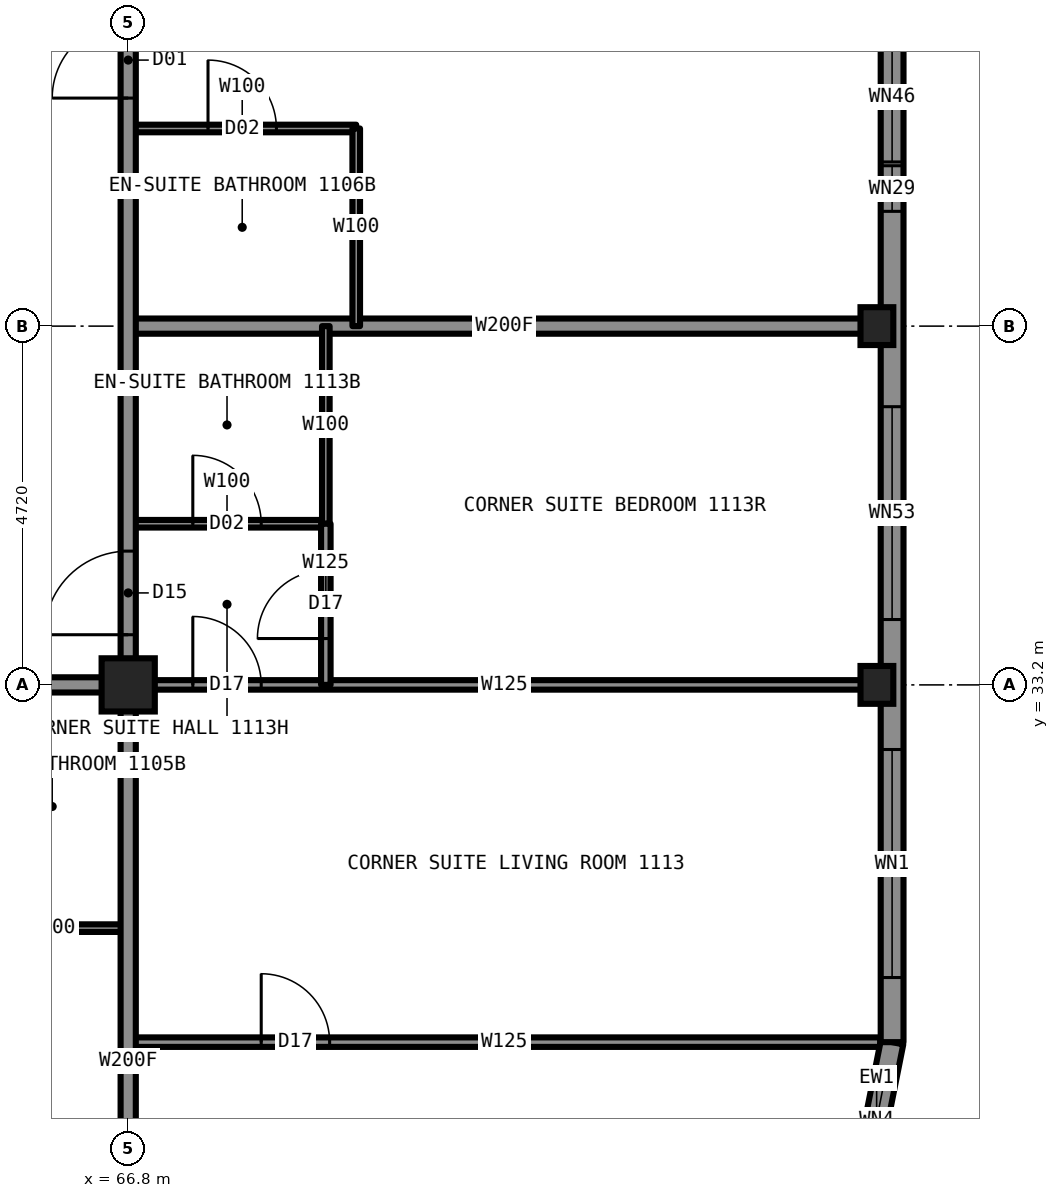
"""IFC4 building model, lengths in metres.
Left out: names, types, materials, properties, quantities, classifications, styles, units other than length and angle.
Written with IfcOpenShell. Run it as: python <this file> out.ifc"""

import sys

from ifc_helpers import new_model, si_unit, direction, frame, frame_2d, origin, origin_2d, place, context, subcontext, project, spatial, rectangle, hollow_rectangle, i_section, extrude, element, fill, save


model = new_model("IFC4")
c1 = context("Model", 3, precision=1e-05, world=origin(), true_north=direction((0.0, 1.0)))
c2 = subcontext(c1, "Body", "Model", "MODEL_VIEW")
j1 = project(units=[si_unit("LENGTHUNIT", "METRE"), si_unit("PLANEANGLEUNIT", "RADIAN")], contexts=[c1])
p1 = place(None, origin())
s1 = spatial("IfcSite", under=j1, at=p1, CompositionType="ELEMENT")
p2 = place(p1, origin())
s2 = spatial("IfcBuilding", under=s1, at=p2, CompositionType="ELEMENT")
p3 = place(p2, frame((0.0, 0.0, 39.0)))
s3 = spatial("IfcBuildingStorey", under=s2, at=p3, CompositionType="ELEMENT", Elevation=39.0)
for number, where, z_axis, x_axis in (
    (1, (76.65, 33.2, 0.0), (0.0, 0.0, 1.0), (1.0, 0.0, 0.0)),
    (2, (76.65, 37.92, 0.0), (0.0, 0.0, 1.0), (1.0, 0.0, 0.0)),
):
    element("IfcColumn", number, at=place(p3, frame(where, z_axis=z_axis, x_axis=x_axis)), inside=s3, PredefinedType="COLUMN", context=c2, shape_type="SweptSolid", body=[
        extrude(i_section(OverallWidth=0.432, OverallDepth=0.498, WebThickness=0.056, FlangeThickness=0.089, at=origin_2d()), origin(), (0.0, 0.0, 1.0), 3.5),
    ])
p4 = place(p3, frame((66.8, 33.2, 0.0), z_axis=(0.0, 0.0, 1.0), x_axis=(1.0, 0.0, 0.0)))
e3 = element("IfcColumn", 3, at=p4, inside=s3, PredefinedType="COLUMN", context=c2, shape_type="SweptSolid", body=[
    extrude(hollow_rectangle(XDim=0.7, YDim=0.7, WallThickness=0.06, at=origin_2d()), origin(), (0.0, 0.0, 1.0), 3.5),
])
p5 = place(p3, frame((43.2, 33.2, 0.0), z_axis=(0.0, 0.0, 1.0), x_axis=(1.0, 0.0, 0.0)))
e4 = element("IfcWall", 4, at=p5, inside=s3, PredefinedType="PARTITIONING", context=c2, shape_type="SweptSolid", body=[
    extrude(rectangle(XDim=23.6, YDim=0.2, at=frame_2d((11.8, 0.0))), origin(), (0.0, 0.0, 1.0), 3.33),
])
p6 = place(p5, frame((2.55, 0.0, 0.0)))
e5 = element("IfcOpeningElement", 5, at=p6, cuts=e4, PredefinedType="OPENING", context=c2, shape_type="SweptSolid", body=[
    extrude(rectangle(XDim=1.0, YDim=2.2, at=frame_2d((0.5, 1.1))), frame((0.0, 0.11, 0.0), z_axis=(0.0, -1.0, 0.0), x_axis=(1.0, 0.0, 0.0)), (0.0, 0.0, 1.0), 0.22),
])
p7 = place(p5, frame((6.57, 0.0, 0.0)))
e6 = element("IfcOpeningElement", 6, at=p7, cuts=e4, PredefinedType="OPENING", context=c2, shape_type="SweptSolid", body=[
    extrude(rectangle(XDim=1.1, YDim=2.2, at=frame_2d((0.55, 1.1))), frame((0.0, 0.11, 0.0), z_axis=(0.0, -1.0, 0.0), x_axis=(1.0, 0.0, 0.0)), (0.0, 0.0, 1.0), 0.22),
])
p8 = place(p5, frame((20.34, 0.0, 0.0)))
e7 = element("IfcOpeningElement", 7, at=p8, cuts=e4, PredefinedType="OPENING", context=c2, shape_type="SweptSolid", body=[
    extrude(rectangle(XDim=1.0, YDim=2.2, at=frame_2d((0.5, 1.1))), frame((0.0, 0.11, 0.0), z_axis=(0.0, -1.0, 0.0), x_axis=(1.0, 0.0, 0.0)), (0.0, 0.0, 1.0), 0.22),
])
p9 = place(p3, frame((66.8, 33.2, 0.0), z_axis=(0.0, 0.0, 1.0), x_axis=(1.0, 0.0, 0.0)))
e8 = element("IfcWall", 8, at=p9, inside=s3, PredefinedType="PARTITIONING", context=c2, shape_type="SweptSolid", body=[
    extrude(rectangle(XDim=9.9, YDim=0.125, at=frame_2d((4.95, 0.0))), origin(), (0.0, 0.0, 1.0), 2.573),
])
p10 = place(p9, frame((0.85, 0.0, 0.0)))
e9 = element("IfcOpeningElement", 9, at=p10, cuts=e8, PredefinedType="OPENING", context=c2, shape_type="SweptSolid", body=[
    extrude(rectangle(XDim=0.9, YDim=2.2, at=frame_2d((0.45, 1.1))), frame((0.0, 0.073, 0.0), z_axis=(0.0, -1.0, 0.0), x_axis=(1.0, 0.0, 0.0)), (0.0, 0.0, 1.0), 0.145),
])
p11 = place(p3, frame((64.8, 30.0, 0.0), z_axis=(0.0, 0.0, 1.0), x_axis=(1.0, 0.0, 0.0)))
e10 = element("IfcWall", 10, at=p11, inside=s3, PredefinedType="PARTITIONING", context=c2, shape_type="SweptSolid", body=[
    extrude(rectangle(XDim=2.0, YDim=0.1, at=frame_2d((1.0, 0.0))), origin(), (0.0, 0.0, 1.0), 3.33),
])
p12 = place(p3, frame((66.8, 28.5, 0.0), z_axis=(0.0, 0.0, 1.0), x_axis=(1.0, 0.0, 0.0)))
e11 = element("IfcWall", 11, at=p12, inside=s3, PredefinedType="PARTITIONING", context=c2, shape_type="SweptSolid", body=[
    extrude(rectangle(XDim=9.894, YDim=0.125, at=frame_2d((4.947, 0.0))), origin(), (0.0, 0.0, 1.0), 3.33),
])
p13 = place(p12, frame((1.75, 0.0, 0.0)))
e12 = element("IfcOpeningElement", 12, at=p13, cuts=e11, PredefinedType="OPENING", context=c2, shape_type="SweptSolid", body=[
    extrude(rectangle(XDim=0.9, YDim=2.2, at=frame_2d((0.45, 1.1))), frame((0.0, 0.073, 0.0), z_axis=(0.0, -1.0, 0.0), x_axis=(1.0, 0.0, 0.0)), (0.0, 0.0, 1.0), 0.145),
])
p14 = place(p3, frame((66.8, 40.52, 0.0), z_axis=(0.0, 0.0, 1.0), x_axis=(1.0, 0.0, 0.0)))
e13 = element("IfcWall", 13, at=p14, inside=s3, PredefinedType="PARTITIONING", context=c2, shape_type="SweptSolid", body=[
    extrude(rectangle(XDim=3.0, YDim=0.1, at=frame_2d((1.5, 0.0))), origin(), (0.0, 0.0, 1.0), 3.33),
])
p15 = place(p14, frame((1.05, 0.0, 0.0)))
e14 = element("IfcOpeningElement", 14, at=p15, cuts=e13, PredefinedType="OPENING", context=c2, shape_type="SweptSolid", body=[
    extrude(rectangle(XDim=0.9, YDim=2.1, at=frame_2d((0.45, 1.05))), frame((0.0, 0.06, 0.0), z_axis=(0.0, -1.0, 0.0), x_axis=(1.0, 0.0, 0.0)), (0.0, 0.0, 1.0), 0.12),
])
p16 = place(p3, frame((66.8, 37.92, 0.0), z_axis=(0.0, 0.0, 1.0), x_axis=(1.0, 0.0, 0.0)))
e15 = element("IfcWall", 15, at=p16, inside=s3, PredefinedType="PARTITIONING", context=c2, shape_type="SweptSolid", body=[
    extrude(rectangle(XDim=9.9, YDim=0.2, at=frame_2d((4.95, 0.0))), origin(), (0.0, 0.0, 1.0), 2.573),
])
p17 = place(p3, frame((66.8, 35.32, 0.0), z_axis=(0.0, 0.0, 1.0), x_axis=(1.0, 0.0, 0.0)))
e16 = element("IfcWall", 16, at=p17, inside=s3, PredefinedType="PARTITIONING", context=c2, shape_type="SweptSolid", body=[
    extrude(rectangle(XDim=2.6, YDim=0.1, at=frame_2d((1.3, 0.0))), origin(), (0.0, 0.0, 1.0), 3.33),
])
p18 = place(p17, frame((0.85, 0.0, 0.0)))
e17 = element("IfcOpeningElement", 17, at=p18, cuts=e16, PredefinedType="OPENING", context=c2, shape_type="SweptSolid", body=[
    extrude(rectangle(XDim=0.9, YDim=2.1, at=frame_2d((0.45, 1.05))), frame((0.0, 0.06, 0.0), z_axis=(0.0, -1.0, 0.0), x_axis=(1.0, 0.0, 0.0)), (0.0, 0.0, 1.0), 0.12),
])
p19 = place(p3, frame((66.8, 33.2, 0.0), z_axis=(0.0, 0.0, 1.0), x_axis=(0.0, 1.0, 0.0)))
e18 = element("IfcWall", 18, at=p19, inside=s3, PredefinedType="PARTITIONING", context=c2, shape_type="SweptSolid", body=[
    extrude(rectangle(XDim=23.58, YDim=0.2, at=frame_2d((11.79, 0.0))), origin(), (0.0, 0.0, 1.0), 3.33),
])
p20 = place(p19, frame((7.72, 0.0, 0.0)))
e19 = element("IfcOpeningElement", 19, at=p20, cuts=e18, PredefinedType="OPENING", context=c2, shape_type="SweptSolid", body=[
    extrude(rectangle(XDim=1.0, YDim=2.2, at=frame_2d((0.5, 1.1))), frame((0.0, 0.11, 0.0), z_axis=(0.0, -1.0, 0.0), x_axis=(1.0, 0.0, 0.0)), (0.0, 0.0, 1.0), 0.22),
])
p21 = place(p19, frame((17.31, 0.0, 0.0)))
e20 = element("IfcOpeningElement", 20, at=p21, cuts=e18, PredefinedType="OPENING", context=c2, shape_type="SweptSolid", body=[
    extrude(rectangle(XDim=1.0, YDim=2.2, at=frame_2d((0.5, 1.1))), frame((0.0, 0.11, 0.0), z_axis=(0.0, -1.0, 0.0), x_axis=(1.0, 0.0, 0.0)), (0.0, 0.0, 1.0), 0.22),
])
p22 = place(p19, frame((21.84, 0.0, 0.0)))
e21 = element("IfcOpeningElement", 21, at=p22, cuts=e18, PredefinedType="OPENING", context=c2, shape_type="SweptSolid", body=[
    extrude(rectangle(XDim=1.1, YDim=2.2, at=frame_2d((0.55, 1.1))), frame((0.0, 0.11, 0.0), z_axis=(0.0, -1.0, 0.0), x_axis=(1.0, 0.0, 0.0)), (0.0, 0.0, 1.0), 0.22),
])
p23 = place(p19, frame((0.66, 0.0, 0.0)))
e22 = element("IfcOpeningElement", 22, at=p23, cuts=e18, PredefinedType="OPENING", context=c2, shape_type="SweptSolid", body=[
    extrude(rectangle(XDim=1.1, YDim=2.2, at=frame_2d((0.55, 1.1))), frame((0.0, 0.11, 0.0), z_axis=(0.0, -1.0, 0.0), x_axis=(1.0, 0.0, 0.0)), (0.0, 0.0, 1.0), 0.22),
])
p24 = place(p3, frame((66.8, 23.3, 0.0), z_axis=(0.0, 0.0, 1.0), x_axis=(0.0, 1.0, 0.0)))
e23 = element("IfcWall", 23, at=p24, inside=s3, PredefinedType="PARTITIONING", context=c2, shape_type="SweptSolid", body=[
    extrude(rectangle(XDim=9.9, YDim=0.2, at=frame_2d((4.95, 0.0))), origin(), (0.0, 0.0, 1.0), 2.573),
])
p25 = place(p3, frame((69.4, 35.32, 0.0), z_axis=(0.0, 0.0, 1.0), x_axis=(0.0, 1.0, 0.0)))
e24 = element("IfcWall", 24, at=p25, inside=s3, PredefinedType="PARTITIONING", context=c2, shape_type="SweptSolid", body=[
    extrude(rectangle(XDim=2.6, YDim=0.1, at=frame_2d((1.3, 0.0))), origin(), (0.0, 0.0, 1.0), 3.33),
])
p26 = place(p3, frame((69.4, 33.2, 0.0), z_axis=(0.0, 0.0, 1.0), x_axis=(0.0, 1.0, 0.0)))
e25 = element("IfcWall", 25, at=p26, inside=s3, PredefinedType="PARTITIONING", context=c2, shape_type="SweptSolid", body=[
    extrude(rectangle(XDim=2.12, YDim=0.125, at=frame_2d((1.06, 0.0))), origin(), (0.0, 0.0, 1.0), 3.33),
])
p27 = place(p26, frame((0.61, 0.0, 0.0)))
e26 = element("IfcOpeningElement", 26, at=p27, cuts=e25, PredefinedType="OPENING", context=c2, shape_type="SweptSolid", body=[
    extrude(rectangle(XDim=0.9, YDim=2.2, at=frame_2d((0.45, 1.1))), frame((0.0, 0.073, 0.0), z_axis=(0.0, -1.0, 0.0), x_axis=(1.0, 0.0, 0.0)), (0.0, 0.0, 1.0), 0.145),
])
p28 = place(p3, frame((69.8, 37.92, 0.0), z_axis=(0.0, 0.0, 1.0), x_axis=(0.0, 1.0, 0.0)))
e27 = element("IfcWall", 27, at=p28, inside=s3, PredefinedType="PARTITIONING", context=c2, shape_type="SweptSolid", body=[
    extrude(rectangle(XDim=2.6, YDim=0.1, at=frame_2d((1.3, 0.0))), origin(), (0.0, 0.0, 1.0), 3.33),
])
p29 = place(p3, frame((76.443, 26.453, 0.0), z_axis=(0.0, 0.0, 1.0), x_axis=(0.195081421501, 0.980787050784, 0.0)))
e28 = element("IfcWall", 28, at=p29, inside=s3, PredefinedType="SOLIDWALL", context=c2, shape_type="SweptSolid", body=[
    extrude(rectangle(XDim=2.087, YDim=0.3, at=frame_2d((1.044, 0.0))), origin(), (0.0, 0.0, 1.0), 3.33),
])
p30 = place(p29, frame((0.444, 0.0, 0.5)))
e29 = element("IfcOpeningElement", 29, at=p30, cuts=e28, PredefinedType="OPENING", context=c2, shape_type="SweptSolid", body=[
    extrude(rectangle(XDim=1.2, YDim=2.0, at=frame_2d((0.6, 1.0))), frame((0.0, 0.16, 0.0), z_axis=(0.0, -1.0, 0.0), x_axis=(1.0, 0.0, 0.0)), (0.0, 0.0, 1.0), 0.32),
])
p31 = place(p3, frame((76.85, 28.5, 0.0), z_axis=(0.0, 0.0, 1.0), x_axis=(0.0, 1.0, 0.0)))
e30 = element("IfcWall", 30, at=p31, inside=s3, PredefinedType="SOLIDWALL", context=c2, shape_type="SweptSolid", body=[
    extrude(rectangle(XDim=33.0, YDim=0.3, at=frame_2d((16.5, 0.0))), origin(), (0.0, 0.0, 1.0), 2.83),
])
p32 = place(p31, frame((0.85, 0.0, 0.5)))
e31 = element("IfcOpeningElement", 31, at=p32, cuts=e30, PredefinedType="OPENING", context=c2, shape_type="SweptSolid", body=[
    extrude(rectangle(XDim=2.5, YDim=2.0, at=frame_2d((1.25, 1.0))), frame((0.0, 0.16, 0.0), z_axis=(0.0, -1.0, 0.0), x_axis=(1.0, 0.0, 0.0)), (0.0, 0.0, 1.0), 0.32),
])
p33 = place(p31, frame((6.61, 0.0, 0.5)))
e32 = element("IfcOpeningElement", 32, at=p33, cuts=e30, PredefinedType="OPENING", context=c2, shape_type="SweptSolid", body=[
    extrude(rectangle(XDim=1.9, YDim=1.9, at=frame_2d((0.95, 0.95))), frame((0.0, 0.16, 0.0), z_axis=(0.0, -1.0, 0.0), x_axis=(1.0, 0.0, 0.0)), (0.0, 0.0, 1.0), 0.32),
])
p34 = place(p31, frame((10.28, 0.0, 0.5)))
e33 = element("IfcOpeningElement", 33, at=p34, cuts=e30, PredefinedType="OPENING", context=c2, shape_type="SweptSolid", body=[
    extrude(rectangle(XDim=3.0, YDim=2.0, at=frame_2d((1.5, 1.0))), frame((0.0, 0.16, 0.0), z_axis=(0.0, -1.0, 0.0), x_axis=(1.0, 0.0, 0.0)), (0.0, 0.0, 1.0), 0.32),
])
p35 = place(p31, frame((15.0, 0.0, 0.5)))
e34 = element("IfcOpeningElement", 34, at=p35, cuts=e30, PredefinedType="OPENING", context=c2, shape_type="SweptSolid", body=[
    extrude(rectangle(XDim=3.0, YDim=2.0, at=frame_2d((1.5, 1.0))), frame((0.0, 0.16, 0.0), z_axis=(0.0, -1.0, 0.0), x_axis=(1.0, 0.0, 0.0)), (0.0, 0.0, 1.0), 0.32),
])
p36 = place(p31, frame((19.72, 0.0, 0.5)))
e35 = element("IfcOpeningElement", 35, at=p36, cuts=e30, PredefinedType="OPENING", context=c2, shape_type="SweptSolid", body=[
    extrude(rectangle(XDim=3.0, YDim=2.0, at=frame_2d((1.5, 1.0))), frame((0.0, 0.16, 0.0), z_axis=(0.0, -1.0, 0.0), x_axis=(1.0, 0.0, 0.0)), (0.0, 0.0, 1.0), 0.32),
])
p37 = place(p31, frame((24.44, 0.0, 0.5)))
e36 = element("IfcOpeningElement", 36, at=p37, cuts=e30, PredefinedType="OPENING", context=c2, shape_type="SweptSolid", body=[
    extrude(rectangle(XDim=1.9, YDim=1.9, at=frame_2d((0.95, 0.95))), frame((0.0, 0.16, 0.0), z_axis=(0.0, -1.0, 0.0), x_axis=(1.0, 0.0, 0.0)), (0.0, 0.0, 1.0), 0.32),
])
p38 = place(p31, frame((29.6, 0.0, 0.5)))
e37 = element("IfcOpeningElement", 37, at=p38, cuts=e30, PredefinedType="OPENING", context=c2, shape_type="SweptSolid", body=[
    extrude(rectangle(XDim=2.5, YDim=2.0, at=frame_2d((1.25, 1.0))), frame((0.0, 0.16, 0.0), z_axis=(0.0, -1.0, 0.0), x_axis=(1.0, 0.0, 0.0)), (0.0, 0.0, 1.0), 0.32),
])
p39 = place(p31, frame((5.91, 0.0, 0.5)))
e38 = element("IfcOpeningElement", 38, at=p39, cuts=e30, PredefinedType="OPENING", context=c2, shape_type="SweptSolid", body=[
    extrude(rectangle(XDim=0.7, YDim=1.0, at=frame_2d((0.35, 0.5))), frame((0.0, 0.16, 0.0), z_axis=(0.0, -1.0, 0.0), x_axis=(1.0, 0.0, 0.0)), (0.0, 0.0, 1.0), 0.32),
])
p40 = place(p31, frame((26.39, 0.0, 0.5)))
e39 = element("IfcOpeningElement", 39, at=p40, cuts=e30, PredefinedType="OPENING", context=c2, shape_type="SweptSolid", body=[
    extrude(rectangle(XDim=0.7, YDim=1.0, at=frame_2d((0.35, 0.5))), frame((0.0, 0.16, 0.0), z_axis=(0.0, -1.0, 0.0), x_axis=(1.0, 0.0, 0.0)), (0.0, 0.0, 1.0), 0.32),
])
p41 = place(p20, origin())
e40 = element("IfcDoor", 40, at=p41, inside=s3, OperationType="SINGLE_SWING_LEFT", PredefinedType="DOOR", context=c2, shape_type="SweptSolid", body=[
    extrude(rectangle(XDim=1.0, YDim=2.2, at=frame_2d((0.5, 1.1))), frame((0.0, 0.025, 0.0), z_axis=(0.0, -1.0, 0.0), x_axis=(1.0, 0.0, 0.0)), (0.0, 0.0, 1.0), 0.05),
])
fill(e19, e40)
p42 = place(p15, origin())
e41 = element("IfcDoor", 41, at=p42, inside=s3, OperationType="SINGLE_SWING_RIGHT", PredefinedType="DOOR", context=c2, shape_type="SweptSolid", body=[
    extrude(rectangle(XDim=0.9, YDim=2.1, at=frame_2d((0.45, 1.05))), frame((0.0, 0.025, 0.0), z_axis=(0.0, -1.0, 0.0), x_axis=(1.0, 0.0, 0.0)), (0.0, 0.0, 1.0), 0.05),
])
fill(e14, e41)
p43 = place(p10, origin())
e42 = element("IfcDoor", 42, at=p43, inside=s3, OperationType="SINGLE_SWING_LEFT", PredefinedType="DOOR", context=c2, shape_type="SweptSolid", body=[
    extrude(rectangle(XDim=0.9, YDim=2.2, at=frame_2d((0.45, 1.1))), frame((0.0, 0.025, 0.0), z_axis=(0.0, -1.0, 0.0), x_axis=(1.0, 0.0, 0.0)), (0.0, 0.0, 1.0), 0.05),
])
fill(e9, e42)
p44 = place(p18, origin())
e43 = element("IfcDoor", 43, at=p44, inside=s3, OperationType="SINGLE_SWING_RIGHT", PredefinedType="DOOR", context=c2, shape_type="SweptSolid", body=[
    extrude(rectangle(XDim=0.9, YDim=2.1, at=frame_2d((0.45, 1.05))), frame((0.0, 0.025, 0.0), z_axis=(0.0, -1.0, 0.0), x_axis=(1.0, 0.0, 0.0)), (0.0, 0.0, 1.0), 0.05),
])
fill(e17, e43)
p45 = place(p23, origin())
e44 = element("IfcDoor", 44, at=p45, inside=s3, OperationType="SINGLE_SWING_LEFT", PredefinedType="DOOR", context=c2, shape_type="SweptSolid", body=[
    extrude(rectangle(XDim=1.1, YDim=2.2, at=frame_2d((0.55, 1.1))), frame((0.0, 0.025, 0.0), z_axis=(0.0, -1.0, 0.0), x_axis=(1.0, 0.0, 0.0)), (0.0, 0.0, 1.0), 0.05),
])
fill(e22, e44)
p46 = place(p13, origin())
e45 = element("IfcDoor", 45, at=p46, inside=s3, OperationType="SINGLE_SWING_LEFT", PredefinedType="DOOR", context=c2, shape_type="SweptSolid", body=[
    extrude(rectangle(XDim=0.9, YDim=2.2, at=frame_2d((0.45, 1.1))), frame((0.0, 0.025, 0.0), z_axis=(0.0, -1.0, 0.0), x_axis=(1.0, 0.0, 0.0)), (0.0, 0.0, 1.0), 0.05),
])
fill(e12, e45)
p47 = place(p27, origin())
e46 = element("IfcDoor", 46, at=p47, inside=s3, OperationType="SINGLE_SWING_LEFT", PredefinedType="DOOR", context=c2, shape_type="SweptSolid", body=[
    extrude(rectangle(XDim=0.9, YDim=2.2, at=frame_2d((0.45, 1.1))), frame((0.0, 0.025, 0.0), z_axis=(0.0, -1.0, 0.0), x_axis=(1.0, 0.0, 0.0)), (0.0, 0.0, 1.0), 0.05),
])
fill(e26, e46)
p48 = place(p30, origin())
e47 = element("IfcWindow", 47, at=p48, inside=s3, PartitioningType="SINGLE_PANEL", PredefinedType="WINDOW", context=c2, shape_type="SweptSolid", body=[
    extrude(rectangle(XDim=1.2, YDim=2.0, at=frame_2d((0.6, 1.0))), frame((0.0, 0.03, 0.0), z_axis=(0.0, -1.0, 0.0), x_axis=(1.0, 0.0, 0.0)), (0.0, 0.0, 1.0), 0.06),
])
fill(e29, e47)
p49 = place(p32, origin())
e48 = element("IfcWindow", 48, at=p49, inside=s3, PartitioningType="SINGLE_PANEL", PredefinedType="WINDOW", context=c2, shape_type="SweptSolid", body=[
    extrude(rectangle(XDim=2.5, YDim=2.0, at=frame_2d((1.25, 1.0))), frame((0.0, 0.03, 0.0), z_axis=(0.0, -1.0, 0.0), x_axis=(1.0, 0.0, 0.0)), (0.0, 0.0, 1.0), 0.06),
])
fill(e31, e48)
p50 = place(p33, origin())
e49 = element("IfcWindow", 49, at=p50, inside=s3, PartitioningType="SINGLE_PANEL", PredefinedType="WINDOW", context=c2, shape_type="SweptSolid", body=[
    extrude(rectangle(XDim=1.9, YDim=1.9, at=frame_2d((0.95, 0.95))), frame((0.0, 0.03, 0.0), z_axis=(0.0, -1.0, 0.0), x_axis=(1.0, 0.0, 0.0)), (0.0, 0.0, 1.0), 0.06),
])
fill(e32, e49)
p51 = place(p34, origin())
e50 = element("IfcWindow", 50, at=p51, inside=s3, PartitioningType="SINGLE_PANEL", PredefinedType="WINDOW", context=c2, shape_type="SweptSolid", body=[
    extrude(rectangle(XDim=3.0, YDim=2.0, at=frame_2d((1.5, 1.0))), frame((0.0, 0.03, 0.0), z_axis=(0.0, -1.0, 0.0), x_axis=(1.0, 0.0, 0.0)), (0.0, 0.0, 1.0), 0.06),
])
fill(e33, e50)
p52 = place(p39, origin())
e51 = element("IfcWindow", 51, at=p52, inside=s3, PartitioningType="SINGLE_PANEL", PredefinedType="WINDOW", context=c2, shape_type="SweptSolid", body=[
    extrude(rectangle(XDim=0.7, YDim=1.0, at=frame_2d((0.35, 0.5))), frame((0.0, 0.03, 0.0), z_axis=(0.0, -1.0, 0.0), x_axis=(1.0, 0.0, 0.0)), (0.0, 0.0, 1.0), 0.06),
])
fill(e38, e51)
save(model, sys.argv[1])
